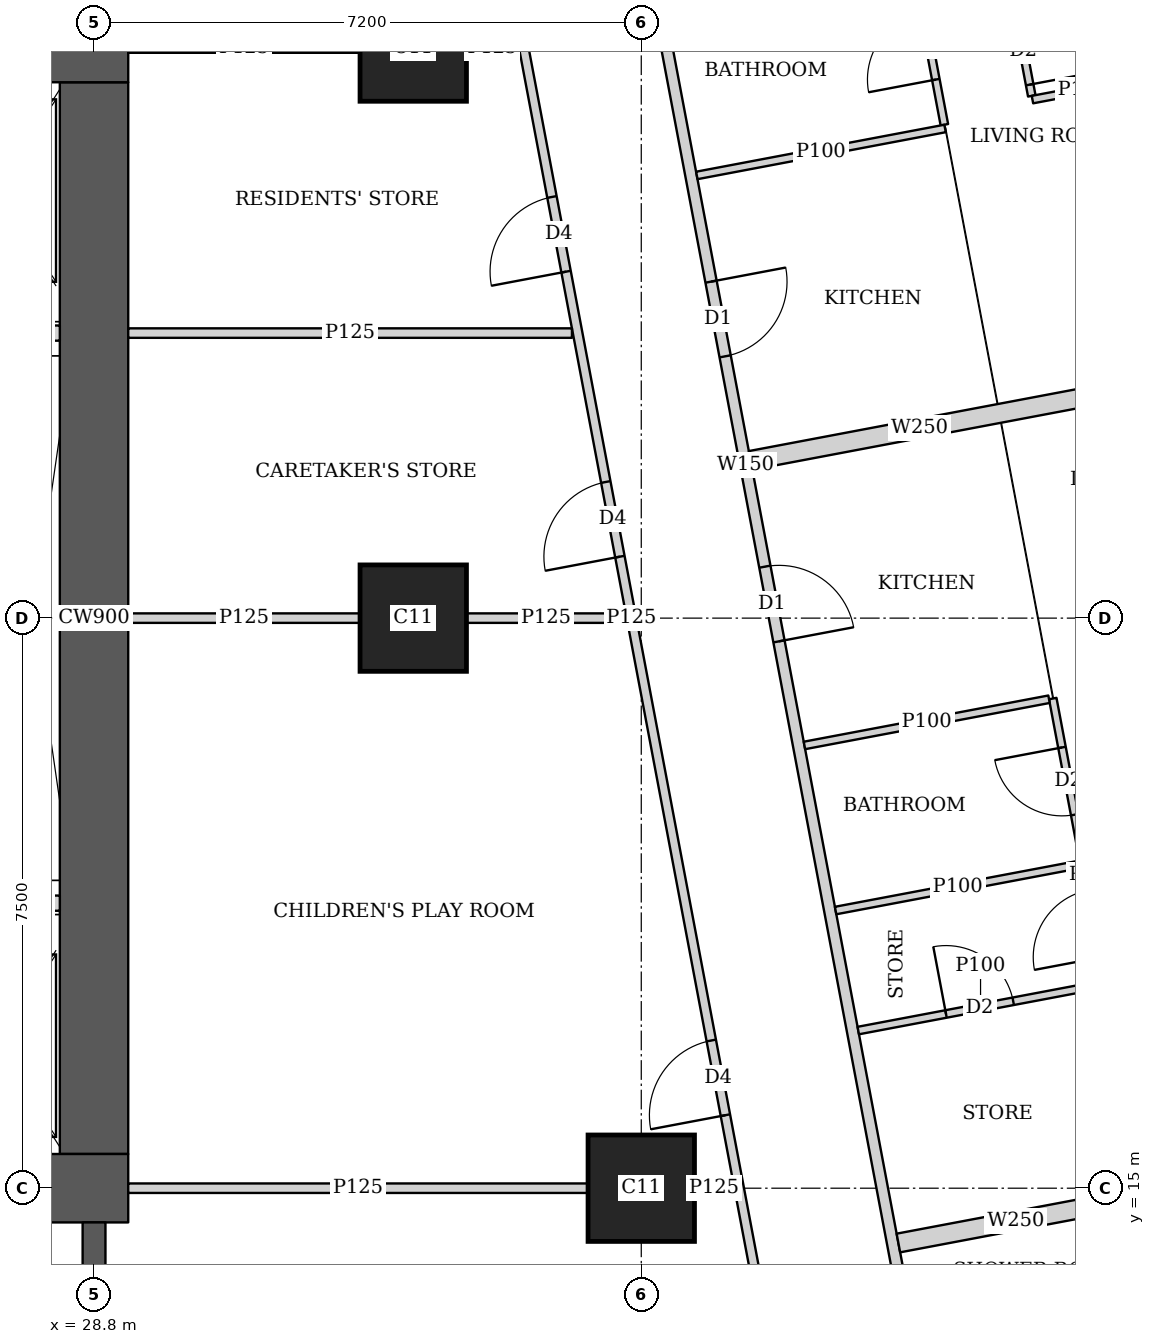
"""IFC4 building model, lengths in metres.
Left out: names, types, materials, properties, quantities, classifications, styles, units other than length and angle.
Written with IfcOpenShell. Run it as: python <this file> out.ifc"""

import sys

from ifc_helpers import new_model, si_unit, direction, frame, frame_2d, origin, origin_2d, place, context, subcontext, project, spatial, rectangle, extrude, element, fill, save


model = new_model("IFC4")
c1 = context("Model", 3, precision=1e-05, world=origin(), true_north=direction((0.0, 1.0)))
c2 = subcontext(c1, "Body", "Model", "MODEL_VIEW")
j1 = project(units=[si_unit("LENGTHUNIT", "METRE"), si_unit("PLANEANGLEUNIT", "RADIAN")], contexts=[c1])
p1 = place(None, origin())
s1 = spatial("IfcSite", under=j1, at=p1, CompositionType="ELEMENT")
p2 = place(p1, origin())
s2 = spatial("IfcBuilding", under=s1, at=p2, CompositionType="ELEMENT")
p3 = place(p2, frame((0.0, 0.0, 270.35)))
s3 = spatial("IfcBuildingStorey", under=s2, at=p3, CompositionType="ELEMENT", Elevation=270.35)
for number, where, z_axis, x_axis in (
    (1, (36.0, 15.0, 0.0), (0.0, 0.0, 1.0), (1.0, 0.0, 0.0)),
    (2, (33.0, 22.5, 0.0), (0.0, 0.0, 1.0), (1.0, 0.0, 0.0)),
    (3, (33.0, 30.0, 0.0), (0.0, 0.0, 1.0), (1.0, 0.0, 0.0)),
):
    element("IfcColumn", number, at=place(p3, frame(where, z_axis=z_axis, x_axis=x_axis)), inside=s3, PredefinedType="COLUMN", context=c2, shape_type="SweptSolid", body=[
        extrude(rectangle(XDim=1.4, YDim=1.4, at=origin_2d()), origin(), (0.0, 0.0, 1.0), 3.75),
    ])
p4 = place(p3, frame((13.95, 15.0, 0.0), z_axis=(0.0, 0.0, 1.0), x_axis=(1.0, 0.0, 0.0)))
e4 = element("IfcWall", 4, at=p4, inside=s3, PredefinedType="SHEAR", context=c2, shape_type="SweptSolid", body=[
    extrude(rectangle(XDim=15.3, YDim=0.9, at=frame_2d((7.65, 0.0))), origin(), (0.0, 0.0, 1.0), 3.75),
])
p5 = place(p4, frame((4.45, 0.0, 0.0)))
e5 = element("IfcOpeningElement", 5, at=p5, cuts=e4, PredefinedType="OPENING", context=c2, shape_type="SweptSolid", body=[
    extrude(rectangle(XDim=1.8, YDim=2.1, at=frame_2d((0.9, 1.05))), frame((0.0, 0.46, 0.0), z_axis=(0.0, -1.0, 0.0), x_axis=(1.0, 0.0, 0.0)), (0.0, 0.0, 1.0), 0.92),
])
p6 = place(p4, frame((10.7, 0.0, 0.0)))
e6 = element("IfcOpeningElement", 6, at=p6, cuts=e4, PredefinedType="OPENING", context=c2, shape_type="SweptSolid", body=[
    extrude(rectangle(XDim=1.1, YDim=2.1, at=frame_2d((0.55, 1.05))), frame((0.0, 0.46, 0.0), z_axis=(0.0, -1.0, 0.0), x_axis=(1.0, 0.0, 0.0)), (0.0, 0.0, 1.0), 0.92),
])
p7 = place(p3, frame((13.95, 30.0, 0.0), z_axis=(0.0, 0.0, 1.0), x_axis=(1.0, 0.0, 0.0)))
e7 = element("IfcWall", 7, at=p7, inside=s3, PredefinedType="SHEAR", context=c2, shape_type="SweptSolid", body=[
    extrude(rectangle(XDim=15.3, YDim=0.9, at=frame_2d((7.65, 0.0))), origin(), (0.0, 0.0, 1.0), 3.75),
])
p8 = place(p7, frame((4.45, 0.0, 0.0)))
e8 = element("IfcOpeningElement", 8, at=p8, cuts=e7, PredefinedType="OPENING", context=c2, shape_type="SweptSolid", body=[
    extrude(rectangle(XDim=1.8, YDim=2.1, at=frame_2d((0.9, 1.05))), frame((0.0, 0.46, 0.0), z_axis=(0.0, -1.0, 0.0), x_axis=(1.0, 0.0, 0.0)), (0.0, 0.0, 1.0), 0.92),
])
p9 = place(p7, frame((10.7, 0.0, 0.0)))
e9 = element("IfcOpeningElement", 9, at=p9, cuts=e7, PredefinedType="OPENING", context=c2, shape_type="SweptSolid", body=[
    extrude(rectangle(XDim=1.1, YDim=2.1, at=frame_2d((0.55, 1.05))), frame((0.0, 0.46, 0.0), z_axis=(0.0, -1.0, 0.0), x_axis=(1.0, 0.0, 0.0)), (0.0, 0.0, 1.0), 0.92),
])
p10 = place(p3, frame((28.8, 15.45, 0.0), z_axis=(0.0, 0.0, 1.0), x_axis=(0.0, 1.0, 0.0)))
e10 = element("IfcWall", 10, at=p10, inside=s3, PredefinedType="SHEAR", context=c2, shape_type="SweptSolid", body=[
    extrude(rectangle(XDim=14.1, YDim=0.9, at=frame_2d((7.05, 0.0))), origin(), (0.0, 0.0, 1.0), 3.75),
])
p11 = place(p3, frame((28.8, 10.35, 0.0), z_axis=(0.0, 0.0, 1.0), x_axis=(0.0, 1.0, 0.0)))
e11 = element("IfcWall", 11, at=p11, inside=s3, PredefinedType="SHEAR", context=c2, shape_type="SweptSolid", body=[
    extrude(rectangle(XDim=4.2, YDim=0.3, at=frame_2d((2.1, 0.0))), origin(), (0.0, 0.0, 1.0), 3.75),
])
p12 = place(p3, frame((34.036, 42.186, 0.0), z_axis=(0.0, 0.0, 1.0), x_axis=(0.185593518645, -0.9826266055, 0.0)))
e12 = element("IfcWall", 12, at=p12, inside=s3, PredefinedType="SOLIDWALL", context=c2, shape_type="SweptSolid", body=[
    extrude(rectangle(XDim=35.961, YDim=0.15, at=frame_2d((17.98, 0.0))), origin(), (0.0, 0.0, 1.0), 2.5),
])
p13 = place(p12, frame((15.529, 0.0, 0.0)))
e13 = element("IfcOpeningElement", 13, at=p13, cuts=e12, PredefinedType="OPENING", context=c2, shape_type="SweptSolid", body=[
    extrude(rectangle(XDim=1.0, YDim=2.1, at=frame_2d((0.5, 1.05))), frame((0.0, 0.085, 0.0), z_axis=(0.0, -1.0, 0.0), x_axis=(1.0, 0.0, 0.0)), (0.0, 0.0, 1.0), 0.17),
])
p14 = place(p12, frame((19.345, 0.0, 0.0)))
e14 = element("IfcOpeningElement", 14, at=p14, cuts=e12, PredefinedType="OPENING", context=c2, shape_type="SweptSolid", body=[
    extrude(rectangle(XDim=1.0, YDim=2.1, at=frame_2d((0.5, 1.05))), frame((0.0, 0.085, 0.0), z_axis=(0.0, -1.0, 0.0), x_axis=(1.0, 0.0, 0.0)), (0.0, 0.0, 1.0), 0.17),
])
p15 = place(p12, frame((30.594, 0.0, 0.0)))
e15 = element("IfcOpeningElement", 15, at=p15, cuts=e12, PredefinedType="OPENING", context=c2, shape_type="SweptSolid", body=[
    extrude(rectangle(XDim=1.0, YDim=2.1, at=frame_2d((0.5, 1.05))), frame((0.0, 0.085, 0.0), z_axis=(0.0, -1.0, 0.0), x_axis=(1.0, 0.0, 0.0)), (0.0, 0.0, 1.0), 0.17),
])
p16 = place(p3, frame((38.744, 42.045, 0.0), z_axis=(0.0, 0.0, 1.0), x_axis=(0.185614085367, -0.982622720739, 0.0)))
e16 = element("IfcWall", 16, at=p16, inside=s3, PredefinedType="PARTITIONING", context=c2, shape_type="SweptSolid", body=[
    extrude(rectangle(XDim=12.898, YDim=0.1, at=frame_2d((6.449, 0.0))), origin(), (0.0, 0.0, 1.0), 2.5),
])
p17 = place(p16, frame((11.848, 0.0, 0.0)))
e17 = element("IfcOpeningElement", 17, at=p17, cuts=e16, PredefinedType="OPENING", context=c2, shape_type="SweptSolid", body=[
    extrude(rectangle(XDim=0.9, YDim=2.1, at=frame_2d((0.45, 1.05))), frame((0.0, 0.06, 0.0), z_axis=(0.0, -1.0, 0.0), x_axis=(1.0, 0.0, 0.0)), (0.0, 0.0, 1.0), 0.12),
])
p18 = place(p16, frame((8.191, 0.0, 0.0)))
e18 = element("IfcOpeningElement", 18, at=p18, cuts=e16, PredefinedType="OPENING", context=c2, shape_type="SweptSolid", body=[
    extrude(rectangle(XDim=0.9, YDim=2.1, at=frame_2d((0.45, 1.05))), frame((0.0, 0.06, 0.0), z_axis=(0.0, -1.0, 0.0), x_axis=(1.0, 0.0, 0.0)), (0.0, 0.0, 1.0), 0.12),
])
p19 = place(p16, frame((4.215, 0.0, 0.0)))
e19 = element("IfcOpeningElement", 19, at=p19, cuts=e16, PredefinedType="OPENING", context=c2, shape_type="SweptSolid", body=[
    extrude(rectangle(XDim=0.9, YDim=2.1, at=frame_2d((0.45, 1.05))), frame((0.0, 0.06, 0.0), z_axis=(0.0, -1.0, 0.0), x_axis=(1.0, 0.0, 0.0)), (0.0, 0.0, 1.0), 0.12),
])
p20 = place(p3, frame((37.511, 42.109, 0.0), z_axis=(0.0, 0.0, 1.0), x_axis=(0.185550464988, -0.982634736279, 0.0)))
e20 = element("IfcWall", 20, at=p20, inside=s3, PredefinedType="PARTITIONING", context=c2, shape_type="SweptSolid", body=[
    extrude(rectangle(XDim=13.35, YDim=0.1, at=frame_2d((6.675, 0.0))), origin(), (0.0, 0.0, 1.0), 2.5),
])
p21 = place(p20, frame((11.845, 0.0, 0.0)))
e21 = element("IfcOpeningElement", 21, at=p21, cuts=e20, PredefinedType="OPENING", context=c2, shape_type="SweptSolid", body=[
    extrude(rectangle(XDim=0.9, YDim=2.1, at=frame_2d((0.45, 1.05))), frame((0.0, 0.06, 0.0), z_axis=(0.0, -1.0, 0.0), x_axis=(1.0, 0.0, 0.0)), (0.0, 0.0, 1.0), 0.12),
])
p22 = place(p20, frame((8.224, 0.0, 0.0)))
e22 = element("IfcOpeningElement", 22, at=p22, cuts=e20, PredefinedType="OPENING", context=c2, shape_type="SweptSolid", body=[
    extrude(rectangle(XDim=0.9, YDim=2.1, at=frame_2d((0.45, 1.05))), frame((0.0, 0.06, 0.0), z_axis=(0.0, -1.0, 0.0), x_axis=(1.0, 0.0, 0.0)), (0.0, 0.0, 1.0), 0.12),
])
p23 = place(p20, frame((2.65, 0.0, 0.0)))
e23 = element("IfcOpeningElement", 23, at=p23, cuts=e20, PredefinedType="OPENING", context=c2, shape_type="SweptSolid", body=[
    extrude(rectangle(XDim=0.9, YDim=2.1, at=frame_2d((0.45, 1.05))), frame((0.0, 0.06, 0.0), z_axis=(0.0, -1.0, 0.0), x_axis=(1.0, 0.0, 0.0)), (0.0, 0.0, 1.0), 0.12),
])
p24 = place(p20, frame((9.936, 0.0, 0.0)))
e24 = element("IfcOpeningElement", 24, at=p24, cuts=e20, PredefinedType="OPENING", context=c2, shape_type="SweptSolid", body=[
    extrude(rectangle(XDim=0.9, YDim=2.1, at=frame_2d((0.45, 1.05))), frame((0.0, 0.06, 0.0), z_axis=(0.0, -1.0, 0.0), x_axis=(1.0, 0.0, 0.0)), (0.0, 0.0, 1.0), 0.12),
])
p25 = place(p20, frame((5.555, 0.0, 0.0)))
e25 = element("IfcOpeningElement", 25, at=p25, cuts=e20, PredefinedType="OPENING", context=c2, shape_type="SweptSolid", body=[
    extrude(rectangle(XDim=0.9, YDim=2.1, at=frame_2d((0.45, 1.05))), frame((0.0, 0.06, 0.0), z_axis=(0.0, -1.0, 0.0), x_axis=(1.0, 0.0, 0.0)), (0.0, 0.0, 1.0), 0.12),
])
p26 = place(p3, frame((42.47, 29.572, 0.0), z_axis=(0.0, 0.0, 1.0), x_axis=(-0.982610503289, -0.185678751683, 0.0)))
e26 = element("IfcWall", 26, at=p26, inside=s3, PredefinedType="PARTITIONING", context=c2, shape_type="SweptSolid", body=[
    extrude(rectangle(XDim=1.346, YDim=0.1, at=frame_2d((0.673, 0.0))), origin(), (0.0, 0.0, 1.0), 2.5),
])
p27 = place(p3, frame((39.997, 28.942, 0.0), z_axis=(0.0, 0.0, 1.0), x_axis=(-0.982569883123, -0.185893584556, 0.0)))
e27 = element("IfcWall", 27, at=p27, inside=s3, PredefinedType="PARTITIONING", context=c2, shape_type="SweptSolid", body=[
    extrude(rectangle(XDim=3.324, YDim=0.1, at=frame_2d((1.662, 0.0))), origin(), (0.0, 0.0, 1.0), 3.5),
])
p28 = place(p3, frame((41.414, 21.442, 0.0), z_axis=(0.0, 0.0, 1.0), x_axis=(0.185698675093, -0.982606738257, 0.0)))
e28 = element("IfcWall", 28, at=p28, inside=s3, PredefinedType="PARTITIONING", context=c2, shape_type="SweptSolid", body=[
    extrude(rectangle(XDim=5.843, YDim=0.1, at=frame_2d((2.921, 0.0))), origin(), (0.0, 0.0, 1.0), 3.5),
])
p29 = place(p28, frame((0.655, 0.0, 0.0)))
e29 = element("IfcOpeningElement", 29, at=p29, cuts=e28, PredefinedType="OPENING", context=c2, shape_type="SweptSolid", body=[
    extrude(rectangle(XDim=0.9, YDim=2.1, at=frame_2d((0.45, 1.05))), frame((0.0, 0.06, 0.0), z_axis=(0.0, -1.0, 0.0), x_axis=(1.0, 0.0, 0.0)), (0.0, 0.0, 1.0), 0.12),
])
p30 = place(p28, frame((2.563, 0.0, 0.0)))
e30 = element("IfcOpeningElement", 30, at=p30, cuts=e28, PredefinedType="OPENING", context=c2, shape_type="SweptSolid", body=[
    extrude(rectangle(XDim=0.9, YDim=2.1, at=frame_2d((0.45, 1.05))), frame((0.0, 0.06, 0.0), z_axis=(0.0, -1.0, 0.0), x_axis=(1.0, 0.0, 0.0)), (0.0, 0.0, 1.0), 0.12),
])
p31 = place(p3, frame((41.365, 21.433, 0.0), z_axis=(0.0, 0.0, 1.0), x_axis=(-0.982607026909, -0.185697147715, 0.0)))
e31 = element("IfcWall", 31, at=p31, inside=s3, PredefinedType="PARTITIONING", context=c2, shape_type="SweptSolid", body=[
    extrude(rectangle(XDim=3.275, YDim=0.1, at=frame_2d((1.637, 0.0))), origin(), (0.0, 0.0, 1.0), 3.5),
])
p32 = place(p3, frame((42.073, 17.682, 0.0), z_axis=(0.0, 0.0, 1.0), x_axis=(-0.982620626894, -0.185625169636, 0.0)))
e32 = element("IfcWall", 32, at=p32, inside=s3, PredefinedType="PARTITIONING", context=c2, shape_type="SweptSolid", body=[
    extrude(rectangle(XDim=3.275, YDim=0.1, at=frame_2d((1.637, 0.0))), origin(), (0.0, 0.0, 1.0), 3.5),
])
p33 = place(p32, frame((1.2, 0.0, 0.0)))
e33 = element("IfcOpeningElement", 33, at=p33, cuts=e32, PredefinedType="OPENING", context=c2, shape_type="SweptSolid", body=[
    extrude(rectangle(XDim=0.9, YDim=2.1, at=frame_2d((0.45, 1.05))), frame((0.0, 0.06, 0.0), z_axis=(0.0, -1.0, 0.0), x_axis=(1.0, 0.0, 0.0)), (0.0, 0.0, 1.0), 0.12),
])
p34 = place(p3, frame((41.775, 19.261, 0.0), z_axis=(0.0, 0.0, 1.0), x_axis=(-0.982620626894, -0.185625169636, 0.0)))
e34 = element("IfcWall", 34, at=p34, inside=s3, PredefinedType="PARTITIONING", context=c2, shape_type="SweptSolid", body=[
    extrude(rectangle(XDim=3.275, YDim=0.1, at=frame_2d((1.637, 0.0))), origin(), (0.0, 0.0, 1.0), 3.5),
])
p35 = place(p3, frame((41.885, 25.415, 0.0), z_axis=(0.0, 0.0, 1.0), x_axis=(-0.982612837616, -0.185666398014, 0.0)))
e35 = element("IfcWall", 35, at=p35, inside=s3, PredefinedType="SOLIDWALL", context=c2, shape_type="SweptSolid", body=[
    extrude(rectangle(XDim=4.525, YDim=0.25, at=frame_2d((2.262, 0.0))), origin(), (0.0, 0.0, 1.0), 3.5),
])
p36 = place(p3, frame((42.476, 14.863, 0.0), z_axis=(0.0, 0.0, 1.0), x_axis=(-0.982638716117, -0.185529387398, 0.0)))
e36 = element("IfcWall", 36, at=p36, inside=s3, PredefinedType="SOLIDWALL", context=c2, shape_type="SweptSolid", body=[
    extrude(rectangle(XDim=3.148, YDim=0.25, at=frame_2d((1.574, 0.0))), origin(), (0.0, 0.0, 1.0), 3.5),
])
p37 = place(p3, frame((38.202, 10.163, 0.0), z_axis=(0.0, 0.0, 1.0), x_axis=(-0.185610321132, 0.982623431783, 0.0)))
e37 = element("IfcWall", 37, at=p37, inside=s3, PredefinedType="PARTITIONING", context=c2, shape_type="SweptSolid", body=[
    extrude(rectangle(XDim=25.111, YDim=0.125, at=frame_2d((12.556, 0.0))), origin(), (0.0, 0.0, 1.0), 2.5),
])
p38 = place(p37, frame((0.708, 0.0, 0.0)))
e38 = element("IfcOpeningElement", 38, at=p38, cuts=e37, PredefinedType="OPENING", context=c2, shape_type="SweptSolid", body=[
    extrude(rectangle(XDim=1.0, YDim=2.1, at=frame_2d((0.5, 1.05))), frame((0.0, 0.073, 0.0), z_axis=(0.0, -1.0, 0.0), x_axis=(1.0, 0.0, 0.0)), (0.0, 0.0, 1.0), 0.145),
])
p39 = place(p37, frame((5.9, 0.0, 0.0)))
e39 = element("IfcOpeningElement", 39, at=p39, cuts=e37, PredefinedType="OPENING", context=c2, shape_type="SweptSolid", body=[
    extrude(rectangle(XDim=1.0, YDim=2.1, at=frame_2d((0.5, 1.05))), frame((0.0, 0.073, 0.0), z_axis=(0.0, -1.0, 0.0), x_axis=(1.0, 0.0, 0.0)), (0.0, 0.0, 1.0), 0.145),
])
p40 = place(p37, frame((13.378, 0.0, 0.0)))
e40 = element("IfcOpeningElement", 40, at=p40, cuts=e37, PredefinedType="OPENING", context=c2, shape_type="SweptSolid", body=[
    extrude(rectangle(XDim=1.0, YDim=2.1, at=frame_2d((0.5, 1.05))), frame((0.0, 0.073, 0.0), z_axis=(0.0, -1.0, 0.0), x_axis=(1.0, 0.0, 0.0)), (0.0, 0.0, 1.0), 0.145),
])
p41 = place(p37, frame((17.194, 0.0, 0.0)))
e41 = element("IfcOpeningElement", 41, at=p41, cuts=e37, PredefinedType="OPENING", context=c2, shape_type="SweptSolid", body=[
    extrude(rectangle(XDim=1.0, YDim=2.1, at=frame_2d((0.5, 1.05))), frame((0.0, 0.073, 0.0), z_axis=(0.0, -1.0, 0.0), x_axis=(1.0, 0.0, 0.0)), (0.0, 0.0, 1.0), 0.145),
])
p42 = place(p37, frame((21.15, 0.0, 0.0)))
e42 = element("IfcOpeningElement", 42, at=p42, cuts=e37, PredefinedType="OPENING", context=c2, shape_type="SweptSolid", body=[
    extrude(rectangle(XDim=1.0, YDim=2.1, at=frame_2d((0.5, 1.05))), frame((0.0, 0.073, 0.0), z_axis=(0.0, -1.0, 0.0), x_axis=(1.0, 0.0, 0.0)), (0.0, 0.0, 1.0), 0.145),
])
p43 = place(p3, frame((29.25, 15.0, 0.0), z_axis=(0.0, 0.0, 1.0), x_axis=(1.0, 0.0, 0.0)))
e43 = element("IfcWall", 43, at=p43, inside=s3, PredefinedType="PARTITIONING", context=c2, shape_type="SweptSolid", body=[
    extrude(rectangle(XDim=6.049, YDim=0.125, at=frame_2d((3.024, 0.0))), origin(), (0.0, 0.0, 1.0), 3.5),
])
p44 = place(p3, frame((36.701, 15.0, 0.0), z_axis=(0.0, 0.0, 1.0), x_axis=(1.0, 0.0, 0.0)))
e44 = element("IfcWall", 44, at=p44, inside=s3, PredefinedType="PARTITIONING", context=c2, shape_type="SweptSolid", body=[
    extrude(rectangle(XDim=0.512, YDim=0.125, at=frame_2d((0.256, 0.0))), origin(), (0.0, 0.0, 1.0), 3.5),
])
p45 = place(p3, frame((29.25, 22.5, 0.0), z_axis=(0.0, 0.0, 1.0), x_axis=(1.0, 0.0, 0.0)))
e45 = element("IfcWall", 45, at=p45, inside=s3, PredefinedType="PARTITIONING", context=c2, shape_type="SweptSolid", body=[
    extrude(rectangle(XDim=3.049, YDim=0.125, at=frame_2d((1.524, 0.0))), origin(), (0.0, 0.0, 1.0), 3.5),
])
p46 = place(p3, frame((33.701, 22.5, 0.0), z_axis=(0.0, 0.0, 1.0), x_axis=(1.0, 0.0, 0.0)))
e46 = element("IfcWall", 46, at=p46, inside=s3, PredefinedType="PARTITIONING", context=c2, shape_type="SweptSolid", body=[
    extrude(rectangle(XDim=2.095, YDim=0.125, at=frame_2d((1.047, 0.0))), origin(), (0.0, 0.0, 1.0), 2.5),
])
p47 = place(p3, frame((29.25, 26.25, 0.0), z_axis=(0.0, 0.0, 1.0), x_axis=(1.0, 0.0, 0.0)))
e47 = element("IfcWall", 47, at=p47, inside=s3, PredefinedType="PARTITIONING", context=c2, shape_type="SweptSolid", body=[
    extrude(rectangle(XDim=5.838, YDim=0.125, at=frame_2d((2.919, 0.0))), origin(), (0.0, 0.0, 1.0), 3.5),
])
p48 = place(p3, frame((29.25, 30.0, 0.0), z_axis=(0.0, 0.0, 1.0), x_axis=(1.0, 0.0, 0.0)))
e48 = element("IfcWall", 48, at=p48, inside=s3, PredefinedType="PARTITIONING", context=c2, shape_type="SweptSolid", body=[
    extrude(rectangle(XDim=3.049, YDim=0.125, at=frame_2d((1.524, 0.0))), origin(), (0.0, 0.0, 1.0), 3.5),
])
p49 = place(p3, frame((33.701, 30.0, 0.0), z_axis=(0.0, 0.0, 1.0), x_axis=(1.0, 0.0, 0.0)))
e49 = element("IfcWall", 49, at=p49, inside=s3, PredefinedType="PARTITIONING", context=c2, shape_type="SweptSolid", body=[
    extrude(rectangle(XDim=0.678, YDim=0.125, at=frame_2d((0.339, 0.0))), origin(), (0.0, 0.0, 1.0), 2.5),
])
for number, where, z_axis, x_axis in (
    (50, (27.4, 18.75, 0.0), (0.0, 0.0, 1.0), (1.0, 0.0, 0.0)),
    (51, (27.4, 26.25, 0.0), (0.0, 0.0, 1.0), (1.0, 0.0, 0.0)),
):
    element("IfcWall", number, at=place(p3, frame(where, z_axis=z_axis, x_axis=x_axis)), inside=s3, PredefinedType="SOLIDWALL", context=c2, shape_type="SweptSolid", body=[
        extrude(rectangle(XDim=0.95, YDim=0.2, at=frame_2d((0.475, 0.0))), origin(), (0.0, 0.0, 1.0), 3.5),
    ])
p50 = place(p17, origin())
e52 = element("IfcDoor", 52, at=p50, inside=s3, OperationType="SINGLE_SWING_RIGHT", PredefinedType="DOOR", context=c2, shape_type="SweptSolid", body=[
    extrude(rectangle(XDim=0.9, YDim=2.1, at=frame_2d((0.45, 1.05))), frame((0.0, 0.025, 0.0), z_axis=(0.0, -1.0, 0.0), x_axis=(1.0, 0.0, 0.0)), (0.0, 0.0, 1.0), 0.05),
])
fill(e17, e52)
p51 = place(p21, origin())
e53 = element("IfcDoor", 53, at=p51, inside=s3, OperationType="SINGLE_SWING_LEFT", PredefinedType="DOOR", context=c2, shape_type="SweptSolid", body=[
    extrude(rectangle(XDim=0.9, YDim=2.1, at=frame_2d((0.45, 1.05))), frame((0.0, 0.025, 0.0), z_axis=(0.0, -1.0, 0.0), x_axis=(1.0, 0.0, 0.0)), (0.0, 0.0, 1.0), 0.05),
])
fill(e21, e53)
p52 = place(p13, origin())
e54 = element("IfcDoor", 54, at=p52, inside=s3, OperationType="SINGLE_SWING_LEFT", PredefinedType="DOOR", context=c2, shape_type="SweptSolid", body=[
    extrude(rectangle(XDim=1.0, YDim=2.1, at=frame_2d((0.5, 1.05))), frame((0.0, 0.025, 0.0), z_axis=(0.0, -1.0, 0.0), x_axis=(1.0, 0.0, 0.0)), (0.0, 0.0, 1.0), 0.05),
])
fill(e13, e54)
p53 = place(p29, origin())
e55 = element("IfcDoor", 55, at=p53, inside=s3, OperationType="SINGLE_SWING_RIGHT", PredefinedType="DOOR", context=c2, shape_type="SweptSolid", body=[
    extrude(rectangle(XDim=0.9, YDim=2.1, at=frame_2d((0.45, 1.05))), frame((0.0, 0.025, 0.0), z_axis=(0.0, -1.0, 0.0), x_axis=(1.0, 0.0, 0.0)), (0.0, 0.0, 1.0), 0.05),
])
fill(e29, e55)
p54 = place(p14, origin())
e56 = element("IfcDoor", 56, at=p54, inside=s3, OperationType="SINGLE_SWING_RIGHT", PredefinedType="DOOR", context=c2, shape_type="SweptSolid", body=[
    extrude(rectangle(XDim=1.0, YDim=2.1, at=frame_2d((0.5, 1.05))), frame((0.0, 0.025, 0.0), z_axis=(0.0, -1.0, 0.0), x_axis=(1.0, 0.0, 0.0)), (0.0, 0.0, 1.0), 0.05),
])
fill(e14, e56)
p55 = place(p33, origin())
e57 = element("IfcDoor", 57, at=p55, inside=s3, OperationType="SINGLE_SWING_LEFT", PredefinedType="DOOR", context=c2, shape_type="SweptSolid", body=[
    extrude(rectangle(XDim=0.9, YDim=2.1, at=frame_2d((0.45, 1.05))), frame((0.0, 0.025, 0.0), z_axis=(0.0, -1.0, 0.0), x_axis=(1.0, 0.0, 0.0)), (0.0, 0.0, 1.0), 0.05),
])
fill(e33, e57)
p56 = place(p39, origin())
e58 = element("IfcDoor", 58, at=p56, inside=s3, OperationType="SINGLE_SWING_LEFT", PredefinedType="DOOR", context=c2, shape_type="SweptSolid", body=[
    extrude(rectangle(XDim=1.0, YDim=2.1, at=frame_2d((0.5, 1.05))), frame((0.0, 0.025, 0.0), z_axis=(0.0, -1.0, 0.0), x_axis=(1.0, 0.0, 0.0)), (0.0, 0.0, 1.0), 0.05),
])
fill(e39, e58)
p57 = place(p40, origin())
e59 = element("IfcDoor", 59, at=p57, inside=s3, OperationType="SINGLE_SWING_LEFT", PredefinedType="DOOR", context=c2, shape_type="SweptSolid", body=[
    extrude(rectangle(XDim=1.0, YDim=2.1, at=frame_2d((0.5, 1.05))), frame((0.0, 0.025, 0.0), z_axis=(0.0, -1.0, 0.0), x_axis=(1.0, 0.0, 0.0)), (0.0, 0.0, 1.0), 0.05),
])
fill(e40, e59)
p58 = place(p41, origin())
e60 = element("IfcDoor", 60, at=p58, inside=s3, OperationType="SINGLE_SWING_LEFT", PredefinedType="DOOR", context=c2, shape_type="SweptSolid", body=[
    extrude(rectangle(XDim=1.0, YDim=2.1, at=frame_2d((0.5, 1.05))), frame((0.0, 0.025, 0.0), z_axis=(0.0, -1.0, 0.0), x_axis=(1.0, 0.0, 0.0)), (0.0, 0.0, 1.0), 0.05),
])
fill(e41, e60)
save(model, sys.argv[1])
